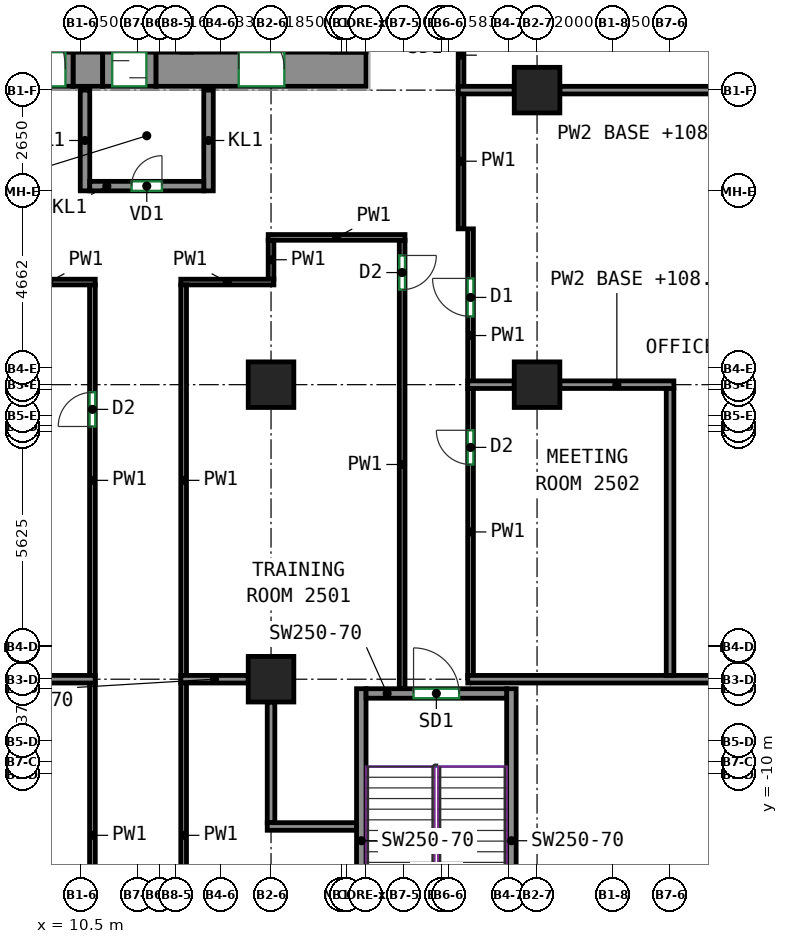
"""IFC4 building model, lengths in metres.
Left out: names, types, materials, properties, quantities, classifications, styles, units other than length and angle.
Written with IfcOpenShell. Run it as: python <this file> out.ifc"""

import sys

from ifc_helpers import new_model, si_unit, direction, frame, frame_2d, origin, origin_2d, place, context, subcontext, project, spatial, rectangle, extrude, source, transform, mapped, element, fill, save


model = new_model("IFC4")
c1 = context("Model", 3, precision=1e-05, world=origin(), true_north=direction((0.0, 1.0)))
c2 = subcontext(c1, "Body", "Model", "MODEL_VIEW")
j1 = project(units=[si_unit("LENGTHUNIT", "METRE"), si_unit("PLANEANGLEUNIT", "RADIAN")], contexts=[c1])
p1 = place(None, origin())
s1 = spatial("IfcSite", under=j1, at=p1, CompositionType="ELEMENT")
p2 = place(p1, origin())
s2 = spatial("IfcBuilding", under=s1, at=p2, CompositionType="ELEMENT")
p3 = place(p2, frame((0.0, 0.0, 108.6)))
s3 = spatial("IfcBuildingStorey", under=s2, at=p3, CompositionType="ELEMENT", Elevation=108.6)
m1 = source(origin(), c2, "Body", "SweptSolid", [
    extrude(rectangle(XDim=1.2, YDim=1.2, at=origin_2d()), origin(), (0.0, 0.0, 1.0), 3.72),
])
for number, where, z_axis, x_axis in (
    (1, (15.5, -7.5, 0.0), (0.0, 0.0, 1.0), (1.0, 0.0, 0.0)),
    (2, (15.5, 0.25, 0.0), (0.0, 0.0, 1.0), (1.0, 0.0, 0.0)),
    (3, (22.5, 0.25, 0.0), (0.0, 0.0, 1.0), (1.0, 0.0, 0.0)),
    (4, (22.5, 8.0, 0.0), (0.0, 0.0, 1.0), (1.0, 0.0, 0.0)),
):
    element("IfcColumn", number, at=place(p3, frame(where, z_axis=z_axis, x_axis=x_axis)), inside=s3, PredefinedType="COLUMN", context=c2, shape_type="MappedRepresentation", body=[
        mapped(m1, transform((0.0, 0.0, 0.0))),
    ])
m2 = source(origin(), c2, "Body", "SweptSolid", [
    extrude(rectangle(XDim=0.78, YDim=0.9, at=frame_2d((0.39, 0.0))), origin(), (0.0, 0.0, 1.0), 3.72),
])
p4 = place(p3, frame((10.29, 8.55, 0.0), z_axis=(0.0, 0.0, 1.0), x_axis=(1.0, 0.0, 0.0)))
e5 = element("IfcWall", 5, at=p4, inside=s3, PredefinedType="SHEAR", context=c2, shape_type="MappedRepresentation", body=[
    mapped(m2, transform((0.0, 0.0, 0.0))),
])
m3 = source(origin(), c2, "Body", "SweptSolid", [
    extrude(rectangle(XDim=5.53, YDim=0.9, at=frame_2d((2.765, 0.0))), origin(), (0.0, 0.0, 1.0), 3.72),
])
p5 = place(p3, frame((12.47, 8.55, 0.0), z_axis=(0.0, 0.0, 1.0), x_axis=(1.0, 0.0, 0.0)))
e6 = element("IfcWall", 6, at=p5, inside=s3, PredefinedType="SHEAR", context=c2, shape_type="MappedRepresentation", body=[
    mapped(m3, transform((0.0, 0.0, 0.0))),
])
p6 = place(p5, frame((2.18, 0.0, 0.0)))
e7 = element("IfcOpeningElement", 7, at=p6, cuts=e6, PredefinedType="OPENING", context=c2, shape_type="SweptSolid", body=[
    extrude(rectangle(XDim=1.2, YDim=2.1, at=frame_2d((0.6, 1.05))), frame((0.0, 0.46, 0.0), z_axis=(0.0, -1.0, 0.0), x_axis=(1.0, 0.0, 0.0)), (0.0, 0.0, 1.0), 0.92),
])
m4 = source(origin(), c2, "Body", "SweptSolid", [
    extrude(rectangle(XDim=8.0, YDim=0.25, at=frame_2d((4.0, 0.0))), origin(), (0.0, 0.0, 1.0), 3.72),
])
for number, where, z_axis, x_axis in (
    (8, (17.875, -15.75, 0.0), (0.0, 0.0, 1.0), (0.0, 1.0, 0.0)),
    (9, (21.825, -15.75, 0.0), (0.0, 0.0, 1.0), (0.0, 1.0, 0.0)),
):
    element("IfcWall", number, at=place(p3, frame(where, z_axis=z_axis, x_axis=x_axis)), inside=s3, PredefinedType="SHEAR", context=c2, shape_type="MappedRepresentation", body=[
        mapped(m4, transform((0.0, 0.0, 0.0))),
    ])
m5 = source(origin(), c2, "Body", "SweptSolid", [
    extrude(rectangle(XDim=3.7, YDim=0.25, at=frame_2d((1.85, 0.0))), origin(), (0.0, 0.0, 1.0), 3.72),
])
p7 = place(p3, frame((18.0, -7.875, 0.0), z_axis=(0.0, 0.0, 1.0), x_axis=(1.0, 0.0, 0.0)))
e10 = element("IfcWall", 10, at=p7, inside=s3, PredefinedType="SHEAR", context=c2, shape_type="MappedRepresentation", body=[
    mapped(m5, transform((0.0, 0.0, 0.0))),
])
p8 = place(p7, frame((1.25, 0.0, 0.0)))
e11 = element("IfcOpeningElement", 11, at=p8, cuts=e10, PredefinedType="OPENING", context=c2, shape_type="SweptSolid", body=[
    extrude(rectangle(XDim=1.2, YDim=2.1, at=frame_2d((0.6, 1.05))), frame((0.0, 0.135, 0.0), z_axis=(0.0, -1.0, 0.0), x_axis=(1.0, 0.0, 0.0)), (0.0, 0.0, 1.0), 0.27),
])
m6 = source(origin(), c2, "Body", "SweptSolid", [
    extrude(rectangle(XDim=2.65, YDim=0.25, at=frame_2d((1.325, 0.0))), origin(), (0.0, 0.0, 1.0), 3.72),
])
for number, where, z_axis, x_axis in (
    (12, (10.605, 5.35, 0.0), (0.0, 0.0, 1.0), (0.0, 1.0, 0.0)),
    (13, (13.855, 5.35, 0.0), (0.0, 0.0, 1.0), (0.0, 1.0, 0.0)),
):
    element("IfcWall", number, at=place(p3, frame(where, z_axis=z_axis, x_axis=x_axis)), inside=s3, PredefinedType="PARTITIONING", context=c2, shape_type="MappedRepresentation", body=[
        mapped(m6, transform((0.0, 0.0, 0.0))),
    ])
m7 = source(origin(), c2, "Body", "SweptSolid", [
    extrude(rectangle(XDim=3.0, YDim=0.25, at=frame_2d((1.5, 0.0))), origin(), (0.0, 0.0, 1.0), 3.72),
])
p9 = place(p3, frame((10.73, 5.475, 0.0), z_axis=(0.0, 0.0, 1.0), x_axis=(1.0, 0.0, 0.0)))
e14 = element("IfcWall", 14, at=p9, inside=s3, PredefinedType="PARTITIONING", context=c2, shape_type="MappedRepresentation", body=[
    mapped(m7, transform((0.0, 0.0, 0.0))),
])
p10 = place(p9, frame((1.1, 0.0, 0.0)))
e15 = element("IfcOpeningElement", 15, at=p10, cuts=e14, PredefinedType="OPENING", context=c2, shape_type="SweptSolid", body=[
    extrude(rectangle(XDim=0.8, YDim=2.0, at=frame_2d((0.4, 1.0))), frame((0.0, 0.135, 0.0), z_axis=(0.0, -1.0, 0.0), x_axis=(1.0, 0.0, 0.0)), (0.0, 0.0, 1.0), 0.27),
])
m8 = source(origin(), c2, "Body", "SweptSolid", [
    extrude(rectangle(XDim=2.4, YDim=0.9, at=frame_2d((1.2, 0.0))), origin(), (0.0, 0.0, 1.0), 2.7),
])
p11 = place(p3, frame((7.89, 8.55, 0.0), z_axis=(0.0, 0.0, 1.0), x_axis=(1.0, 0.0, 0.0)))
e16 = element("IfcWall", 16, at=p11, inside=s3, PredefinedType="PARTITIONING", context=c2, shape_type="MappedRepresentation", body=[
    mapped(m8, transform((0.0, 0.0, 0.0))),
])
p12 = place(p11, frame((0.2, 0.0, 0.0)))
e17 = element("IfcOpeningElement", 17, at=p12, cuts=e16, PredefinedType="OPENING", context=c2, shape_type="SweptSolid", body=[
    extrude(rectangle(XDim=2.0, YDim=2.1, at=frame_2d((1.0, 1.05))), frame((0.0, 0.46, 0.0), z_axis=(0.0, -1.0, 0.0), x_axis=(1.0, 0.0, 0.0)), (0.0, 0.0, 1.0), 0.92),
])
m9 = source(origin(), c2, "Body", "SweptSolid", [
    extrude(rectangle(XDim=1.4, YDim=0.9, at=frame_2d((0.7, 0.0))), origin(), (0.0, 0.0, 1.0), 2.7),
])
p13 = place(p3, frame((11.07, 8.55, 0.0), z_axis=(0.0, 0.0, 1.0), x_axis=(1.0, 0.0, 0.0)))
e18 = element("IfcWall", 18, at=p13, inside=s3, PredefinedType="PARTITIONING", context=c2, shape_type="MappedRepresentation", body=[
    mapped(m9, transform((0.0, 0.0, 0.0))),
])
p14 = place(p13, frame((0.25, 0.0, 0.0)))
e19 = element("IfcOpeningElement", 19, at=p14, cuts=e18, PredefinedType="OPENING", context=c2, shape_type="SweptSolid", body=[
    extrude(rectangle(XDim=0.9, YDim=2.1, at=frame_2d((0.45, 1.05))), frame((0.0, 0.46, 0.0), z_axis=(0.0, -1.0, 0.0), x_axis=(1.0, 0.0, 0.0)), (0.0, 0.0, 1.0), 0.92),
])
p15 = place(p3, frame((10.8, -15.625, 0.0), z_axis=(0.0, 0.0, 1.0), x_axis=(0.0, 1.0, 0.0)))
e20 = element("IfcWall", 20, at=p15, inside=s3, PredefinedType="PARTITIONING", context=c2, shape_type="SweptSolid", body=[
    extrude(rectangle(XDim=8.035, YDim=0.15, at=frame_2d((4.018, 0.0))), origin(), (0.0, 0.0, 1.0), 3.72),
])
p16 = place(p15, frame((0.502, 0.0, 0.0)))
e21 = element("IfcOpeningElement", 21, at=p16, cuts=e20, PredefinedType="OPENING", context=c2, shape_type="SweptSolid", body=[
    extrude(rectangle(XDim=0.9, YDim=2.1, at=frame_2d((0.45, 1.05))), frame((0.0, 0.085, 0.0), z_axis=(0.0, -1.0, 0.0), x_axis=(1.0, 0.0, 0.0)), (0.0, 0.0, 1.0), 0.17),
])
p17 = place(p3, frame((10.8, -7.41, 0.0), z_axis=(0.0, 0.0, 1.0), x_axis=(0.0, 1.0, 0.0)))
e22 = element("IfcWall", 22, at=p17, inside=s3, PredefinedType="PARTITIONING", context=c2, shape_type="SweptSolid", body=[
    extrude(rectangle(XDim=10.285, YDim=0.15, at=frame_2d((5.143, 0.0))), origin(), (0.0, 0.0, 1.0), 3.72),
])
p18 = place(p17, frame((6.56, 0.0, 0.0)))
e23 = element("IfcOpeningElement", 23, at=p18, cuts=e22, PredefinedType="OPENING", context=c2, shape_type="SweptSolid", body=[
    extrude(rectangle(XDim=0.9, YDim=2.1, at=frame_2d((0.45, 1.05))), frame((0.0, 0.085, 0.0), z_axis=(0.0, -1.0, 0.0), x_axis=(1.0, 0.0, 0.0)), (0.0, 0.0, 1.0), 0.17),
])
p19 = place(p3, frame((8.425, 2.95, 0.0), z_axis=(0.0, 0.0, 1.0), x_axis=(1.0, 0.0, 0.0)))
e24 = element("IfcWall", 24, at=p19, inside=s3, PredefinedType="PARTITIONING", context=c2, shape_type="SweptSolid", body=[
    extrude(rectangle(XDim=2.45, YDim=0.15, at=frame_2d((1.225, 0.0))), origin(), (0.0, 0.0, 1.0), 3.72),
])
p20 = place(p3, frame((13.2, -15.625, 0.0), z_axis=(0.0, 0.0, 1.0), x_axis=(0.0, 1.0, 0.0)))
e25 = element("IfcWall", 25, at=p20, inside=s3, PredefinedType="PARTITIONING", context=c2, shape_type="SweptSolid", body=[
    extrude(rectangle(XDim=8.035, YDim=0.15, at=frame_2d((4.018, 0.0))), origin(), (0.0, 0.0, 1.0), 3.72),
])
p21 = place(p20, frame((2.21, 0.0, 0.0)))
e26 = element("IfcOpeningElement", 26, at=p21, cuts=e25, PredefinedType="OPENING", context=c2, shape_type="SweptSolid", body=[
    extrude(rectangle(XDim=0.9, YDim=2.1, at=frame_2d((0.45, 1.05))), frame((0.0, 0.085, 0.0), z_axis=(0.0, -1.0, 0.0), x_axis=(1.0, 0.0, 0.0)), (0.0, 0.0, 1.0), 0.17),
])
p22 = place(p3, frame((18.95, 4.05, 0.0), z_axis=(0.0, 0.0, 1.0), x_axis=(0.0, -1.0, 0.0)))
e27 = element("IfcWall", 27, at=p22, inside=s3, PredefinedType="PARTITIONING", context=c2, shape_type="SweptSolid", body=[
    extrude(rectangle(XDim=11.8, YDim=0.15, at=frame_2d((5.9, 0.0))), origin(), (0.0, 0.0, 1.0), 3.72),
])
p23 = place(p22, frame((0.4, 0.0, 0.0)))
e28 = element("IfcOpeningElement", 28, at=p23, cuts=e27, PredefinedType="OPENING", context=c2, shape_type="SweptSolid", body=[
    extrude(rectangle(XDim=0.9, YDim=2.1, at=frame_2d((0.45, 1.05))), frame((0.0, 0.085, 0.0), z_axis=(0.0, -1.0, 0.0), x_axis=(1.0, 0.0, 0.0)), (0.0, 0.0, 1.0), 0.17),
])
p24 = place(p3, frame((15.425, 4.125, 0.0), z_axis=(0.0, 0.0, 1.0), x_axis=(1.0, 0.0, 0.0)))
e29 = element("IfcWall", 29, at=p24, inside=s3, PredefinedType="PARTITIONING", context=c2, shape_type="SweptSolid", body=[
    extrude(rectangle(XDim=3.6, YDim=0.15, at=frame_2d((1.8, 0.0))), origin(), (0.0, 0.0, 1.0), 3.72),
])
p25 = place(p3, frame((15.5, 3.025, 0.0), z_axis=(0.0, 0.0, 1.0), x_axis=(0.0, 1.0, 0.0)))
e30 = element("IfcWall", 30, at=p25, inside=s3, PredefinedType="PARTITIONING", context=c2, shape_type="SweptSolid", body=[
    extrude(rectangle(XDim=1.025, YDim=0.15, at=frame_2d((0.513, 0.0))), origin(), (0.0, 0.0, 1.0), 3.72),
])
p26 = place(p3, frame((13.125, 2.95, 0.0), z_axis=(0.0, 0.0, 1.0), x_axis=(1.0, 0.0, 0.0)))
e31 = element("IfcWall", 31, at=p26, inside=s3, PredefinedType="PARTITIONING", context=c2, shape_type="SweptSolid", body=[
    extrude(rectangle(XDim=2.45, YDim=0.15, at=frame_2d((1.225, 0.0))), origin(), (0.0, 0.0, 1.0), 3.72),
])
p27 = place(p3, frame((13.2, -7.41, 0.0), z_axis=(0.0, 0.0, 1.0), x_axis=(0.0, 1.0, 0.0)))
e32 = element("IfcWall", 32, at=p27, inside=s3, PredefinedType="PARTITIONING", context=c2, shape_type="SweptSolid", body=[
    extrude(rectangle(XDim=10.285, YDim=0.15, at=frame_2d((5.143, 0.0))), origin(), (0.0, 0.0, 1.0), 3.72),
])
p28 = place(p3, frame((20.75, -7.41, 0.0), z_axis=(0.0, 0.0, 1.0), x_axis=(0.0, 1.0, 0.0)))
e33 = element("IfcWall", 33, at=p28, inside=s3, PredefinedType="PARTITIONING", context=c2, shape_type="SweptSolid", body=[
    extrude(rectangle(XDim=7.57, YDim=0.15, at=frame_2d((3.785, 0.0))), origin(), (0.0, 0.0, 1.0), 3.72),
])
p29 = place(p28, frame((5.56, 0.0, 0.0)))
e34 = element("IfcOpeningElement", 34, at=p29, cuts=e33, PredefinedType="OPENING", context=c2, shape_type="SweptSolid", body=[
    extrude(rectangle(XDim=0.9, YDim=2.1, at=frame_2d((0.45, 1.05))), frame((0.0, 0.085, 0.0), z_axis=(0.0, -1.0, 0.0), x_axis=(1.0, 0.0, 0.0)), (0.0, 0.0, 1.0), 0.17),
])
p30 = place(p3, frame((20.5, 4.35, 0.0), z_axis=(0.0, 0.0, 1.0), x_axis=(0.0, 1.0, 0.0)))
e35 = element("IfcWall", 35, at=p30, inside=s3, PredefinedType="PARTITIONING", context=c2, shape_type="SweptSolid", body=[
    extrude(rectangle(XDim=3.56, YDim=0.15, at=frame_2d((1.78, 0.0))), origin(), (0.0, 0.0, 1.0), 3.72),
])
p31 = place(p3, frame((20.75, 0.34, 0.0), z_axis=(0.0, 0.0, 1.0), x_axis=(0.0, 1.0, 0.0)))
e36 = element("IfcWall", 36, at=p31, inside=s3, PredefinedType="PARTITIONING", context=c2, shape_type="SweptSolid", body=[
    extrude(rectangle(XDim=4.01, YDim=0.15, at=frame_2d((2.005, 0.0))), origin(), (0.0, 0.0, 1.0), 3.72),
])
p32 = place(p31, frame((1.706, 0.0, 0.0)))
e37 = element("IfcOpeningElement", 37, at=p32, cuts=e36, PredefinedType="OPENING", context=c2, shape_type="SweptSolid", body=[
    extrude(rectangle(XDim=1.0, YDim=2.1, at=frame_2d((0.5, 1.05))), frame((0.0, 0.085, 0.0), z_axis=(0.0, -1.0, 0.0), x_axis=(1.0, 0.0, 0.0)), (0.0, 0.0, 1.0), 0.17),
])
p33 = place(p3, frame((20.5, 8.09, 0.0), z_axis=(0.0, 0.0, 1.0), x_axis=(0.0, 1.0, 0.0)))
e38 = element("IfcWall", 38, at=p33, inside=s3, PredefinedType="PARTITIONING", context=c2, shape_type="SweptSolid", body=[
    extrude(rectangle(XDim=1.66, YDim=0.15, at=frame_2d((0.83, 0.0))), origin(), (0.0, 0.0, 1.0), 3.72),
])
p34 = place(p3, frame((-5.6, -7.5, 0.0), z_axis=(0.0, 0.0, 1.0), x_axis=(1.0, 0.0, 0.0)))
e39 = element("IfcWall", 39, at=p34, inside=s3, PredefinedType="PARTITIONING", context=c2, shape_type="SweptSolid", body=[
    extrude(rectangle(XDim=16.474, YDim=0.2, at=frame_2d((8.237, 0.0))), origin(), (0.0, 0.0, 1.0), 3.07),
])
p35 = place(p3, frame((13.126, -7.5, 0.0), z_axis=(0.0, 0.0, 1.0), x_axis=(1.0, 0.0, 0.0)))
e40 = element("IfcWall", 40, at=p35, inside=s3, PredefinedType="PARTITIONING", context=c2, shape_type="SweptSolid", body=[
    extrude(rectangle(XDim=1.774, YDim=0.2, at=frame_2d((0.887, 0.0))), origin(), (0.0, 0.0, 1.0), 3.07),
])
p36 = place(p3, frame((15.5, -11.275, 0.0), z_axis=(0.0, 0.0, 1.0), x_axis=(0.0, 1.0, 0.0)))
e41 = element("IfcWall", 41, at=p36, inside=s3, PredefinedType="PARTITIONING", context=c2, shape_type="SweptSolid", body=[
    extrude(rectangle(XDim=3.175, YDim=0.2, at=frame_2d((1.587, 0.0))), origin(), (0.0, 0.0, 1.0), 3.72),
])
p37 = place(p3, frame((17.75, -11.375, 0.0), z_axis=(0.0, 0.0, 1.0), x_axis=(-1.0, 0.0, 0.0)))
e42 = element("IfcWall", 42, at=p37, inside=s3, PredefinedType="PARTITIONING", context=c2, shape_type="SweptSolid", body=[
    extrude(rectangle(XDim=2.35, YDim=0.2, at=frame_2d((1.175, 0.0))), origin(), (0.0, 0.0, 1.0), 3.72),
])
p38 = place(p3, frame((20.676, -7.5, 0.0), z_axis=(0.0, 0.0, 1.0), x_axis=(1.0, 0.0, 0.0)))
e43 = element("IfcWall", 43, at=p38, inside=s3, PredefinedType="PARTITIONING", context=c2, shape_type="SweptSolid", body=[
    extrude(rectangle(XDim=11.449, YDim=0.2, at=frame_2d((5.725, 0.0))), origin(), (0.0, 0.0, 1.0), 3.72),
])
p39 = place(p3, frame((20.676, 0.25, 0.0), z_axis=(0.0, 0.0, 1.0), x_axis=(1.0, 0.0, 0.0)))
e44 = element("IfcWall", 44, at=p39, inside=s3, PredefinedType="PARTITIONING", context=c2, shape_type="SweptSolid", body=[
    extrude(rectangle(XDim=1.224, YDim=0.2, at=frame_2d((0.612, 0.0))), origin(), (0.0, 0.0, 1.0), 3.72),
])
p40 = place(p3, frame((23.1, 0.25, 0.0), z_axis=(0.0, 0.0, 1.0), x_axis=(1.0, 0.0, 0.0)))
e45 = element("IfcWall", 45, at=p40, inside=s3, PredefinedType="PARTITIONING", context=c2, shape_type="SweptSolid", body=[
    extrude(rectangle(XDim=3.0, YDim=0.2, at=frame_2d((1.5, 0.0))), origin(), (0.0, 0.0, 1.0), 3.07),
])
p41 = place(p3, frame((26.0, -7.4, 0.0), z_axis=(0.0, 0.0, 1.0), x_axis=(0.0, 1.0, 0.0)))
e46 = element("IfcWall", 46, at=p41, inside=s3, PredefinedType="PARTITIONING", context=c2, shape_type="SweptSolid", body=[
    extrude(rectangle(XDim=7.55, YDim=0.2, at=frame_2d((3.775, 0.0))), origin(), (0.0, 0.0, 1.0), 3.72),
])
p42 = place(p3, frame((20.426, 8.0, 0.0), z_axis=(0.0, 0.0, 1.0), x_axis=(1.0, 0.0, 0.0)))
e47 = element("IfcWall", 47, at=p42, inside=s3, PredefinedType="PARTITIONING", context=c2, shape_type="SweptSolid", body=[
    extrude(rectangle(XDim=1.474, YDim=0.2, at=frame_2d((0.737, 0.0))), origin(), (0.0, 0.0, 1.0), 3.72),
])
p43 = place(p3, frame((23.1, 8.0, 0.0), z_axis=(0.0, 0.0, 1.0), x_axis=(1.0, 0.0, 0.0)))
e48 = element("IfcWall", 48, at=p43, inside=s3, PredefinedType="PARTITIONING", context=c2, shape_type="SweptSolid", body=[
    extrude(rectangle(XDim=9.025, YDim=0.2, at=frame_2d((4.512, 0.0))), origin(), (0.0, 0.0, 1.0), 3.07),
])
p44 = place(p12, origin())
e49 = element("IfcDoor", 49, at=p44, inside=s3, OperationType="DOUBLE_DOOR_SINGLE_SWING", PredefinedType="DOOR", context=c2, shape_type="SweptSolid", body=[
    extrude(rectangle(XDim=2.0, YDim=2.1, at=frame_2d((1.0, 1.05))), frame((0.0, 0.355, 0.0), z_axis=(0.0, -1.0, 0.0), x_axis=(1.0, 0.0, 0.0)), (0.0, 0.0, 1.0), 0.05),
])
fill(e17, e49)
p45 = place(p10, origin())
e50 = element("IfcDoor", 50, at=p45, inside=s3, OperationType="SINGLE_SWING_RIGHT", PredefinedType="DOOR", context=c2, shape_type="SweptSolid", body=[
    extrude(rectangle(XDim=0.8, YDim=2.0, at=frame_2d((0.4, 1.0))), frame((0.0, 0.025, 0.0), z_axis=(0.0, -1.0, 0.0), x_axis=(1.0, 0.0, 0.0)), (0.0, 0.0, 1.0), 0.05),
])
fill(e15, e50)
p46 = place(p14, origin())
e51 = element("IfcDoor", 51, at=p46, inside=s3, OperationType="SLIDING_TO_LEFT", PredefinedType="DOOR", context=c2, shape_type="SweptSolid", body=[
    extrude(rectangle(XDim=0.9, YDim=2.1, at=frame_2d((0.45, 1.05))), frame((0.0, 0.355, 0.0), z_axis=(0.0, -1.0, 0.0), x_axis=(1.0, 0.0, 0.0)), (0.0, 0.0, 1.0), 0.05),
])
fill(e19, e51)
p47 = place(p6, origin())
e52 = element("IfcDoor", 52, at=p47, inside=s3, OperationType="DOUBLE_DOOR_SINGLE_SWING", PredefinedType="DOOR", context=c2, shape_type="SweptSolid", body=[
    extrude(rectangle(XDim=1.2, YDim=2.1, at=frame_2d((0.6, 1.05))), frame((0.0, 0.355, 0.0), z_axis=(0.0, -1.0, 0.0), x_axis=(1.0, 0.0, 0.0)), (0.0, 0.0, 1.0), 0.05),
])
fill(e7, e52)
p48 = place(p8, origin())
e53 = element("IfcDoor", 53, at=p48, inside=s3, OperationType="DOUBLE_DOOR_SINGLE_SWING", PredefinedType="DOOR", context=c2, shape_type="SweptSolid", body=[
    extrude(rectangle(XDim=1.2, YDim=2.1, at=frame_2d((0.6, 1.05))), frame((0.0, 0.025, 0.0), z_axis=(0.0, -1.0, 0.0), x_axis=(1.0, 0.0, 0.0)), (0.0, 0.0, 1.0), 0.05),
])
fill(e11, e53)
p49 = place(p29, origin())
e54 = element("IfcDoor", 54, at=p49, inside=s3, OperationType="SINGLE_SWING_RIGHT", PredefinedType="DOOR", context=c2, shape_type="SweptSolid", body=[
    extrude(rectangle(XDim=0.9, YDim=2.1, at=frame_2d((0.45, 1.05))), frame((0.0, 0.025, 0.0), z_axis=(0.0, -1.0, 0.0), x_axis=(1.0, 0.0, 0.0)), (0.0, 0.0, 1.0), 0.05),
])
fill(e34, e54)
p50 = place(p18, origin())
e55 = element("IfcDoor", 55, at=p50, inside=s3, OperationType="SINGLE_SWING_LEFT", PredefinedType="DOOR", context=c2, shape_type="SweptSolid", body=[
    extrude(rectangle(XDim=0.9, YDim=2.1, at=frame_2d((0.45, 1.05))), frame((0.0, 0.025, 0.0), z_axis=(0.0, -1.0, 0.0), x_axis=(1.0, 0.0, 0.0)), (0.0, 0.0, 1.0), 0.05),
])
fill(e23, e55)
p51 = place(p32, origin())
e56 = element("IfcDoor", 56, at=p51, inside=s3, OperationType="SINGLE_SWING_RIGHT", PredefinedType="DOOR", context=c2, shape_type="SweptSolid", body=[
    extrude(rectangle(XDim=1.0, YDim=2.1, at=frame_2d((0.5, 1.05))), frame((0.0, 0.025, 0.0), z_axis=(0.0, -1.0, 0.0), x_axis=(1.0, 0.0, 0.0)), (0.0, 0.0, 1.0), 0.05),
])
fill(e37, e56)
p52 = place(p23, origin())
e57 = element("IfcDoor", 57, at=p52, inside=s3, OperationType="SINGLE_SWING_LEFT", PredefinedType="DOOR", context=c2, shape_type="SweptSolid", body=[
    extrude(rectangle(XDim=0.9, YDim=2.1, at=frame_2d((0.45, 1.05))), frame((0.0, 0.025, 0.0), z_axis=(0.0, -1.0, 0.0), x_axis=(1.0, 0.0, 0.0)), (0.0, 0.0, 1.0), 0.05),
])
fill(e28, e57)
save(model, sys.argv[1])
